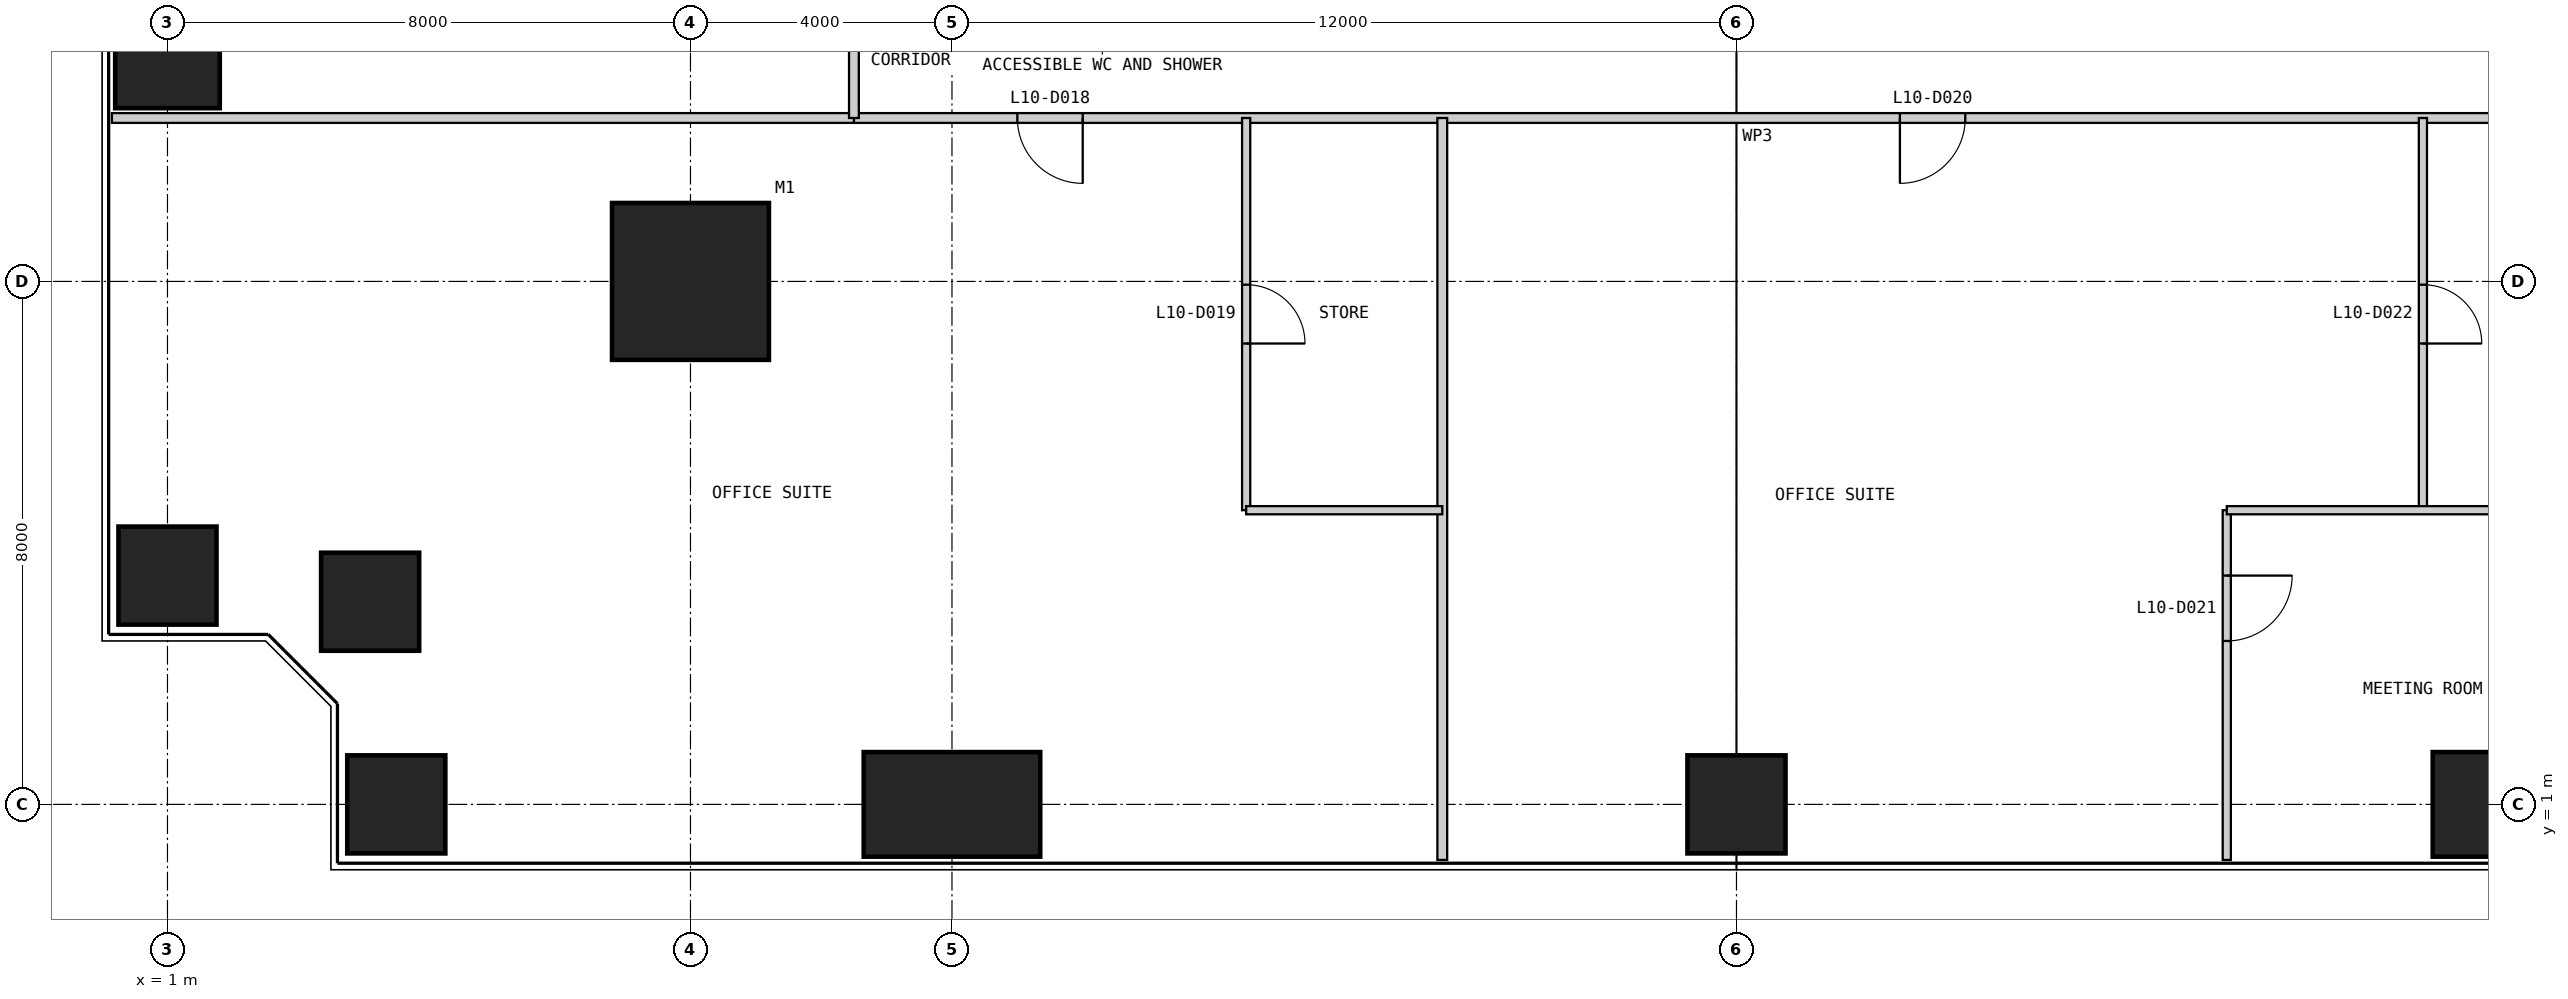
"""IFC4 building model, lengths in metres.
Left out: names, types, materials, properties, quantities, classifications, styles, units other than length and angle.
Written with IfcOpenShell. Run it as: python <this file> out.ifc"""

import sys

from ifc_helpers import new_model, si_unit, direction, frame, frame_2d, origin, origin_2d, place, context, subcontext, project, spatial, rectangle, extrude, element, fill, save


model = new_model("IFC4")
c1 = context("Model", 3, precision=1e-05, world=origin(), true_north=direction((0.0, 1.0)))
c2 = subcontext(c1, "Body", "Model", "MODEL_VIEW")
j1 = project(units=[si_unit("LENGTHUNIT", "METRE"), si_unit("PLANEANGLEUNIT", "RADIAN")], contexts=[c1])
p1 = place(None, origin())
s1 = spatial("IfcSite", under=j1, at=p1, CompositionType="ELEMENT")
p2 = place(p1, origin())
s2 = spatial("IfcBuilding", under=s1, at=p2, CompositionType="ELEMENT")
p3 = place(p2, frame((0.0, 0.0, 47.0)))
s3 = spatial("IfcBuildingStorey", under=s2, at=p3, CompositionType="ELEMENT", Elevation=47.0)
p4 = place(p3, frame((9.0, 9.0, 0.0), z_axis=(0.0, 0.0, 1.0), x_axis=(1.0, 0.0, 0.0)))
e1 = element("IfcColumn", 1, at=p4, inside=s3, PredefinedType="COLUMN", context=c2, shape_type="SweptSolid", body=[
    extrude(rectangle(XDim=2.4, YDim=2.4, at=origin_2d()), origin(), (0.0, 0.0, 1.0), 4.0),
])
p5 = place(p3, frame((4.5, 1.0, 0.0), z_axis=(0.0, 0.0, 1.0), x_axis=(1.0, 0.0, 0.0)))
e2 = element("IfcColumn", 2, at=p5, inside=s3, PredefinedType="COLUMN", context=c2, shape_type="SweptSolid", body=[
    extrude(rectangle(XDim=1.5, YDim=1.5, at=origin_2d()), origin(), (0.0, 0.0, 1.0), 4.0),
])
p6 = place(p3, frame((13.0, 1.0, 0.0), z_axis=(0.0, 0.0, 1.0), x_axis=(1.0, 0.0, 0.0)))
e3 = element("IfcColumn", 3, at=p6, inside=s3, PredefinedType="COLUMN", context=c2, shape_type="SweptSolid", body=[
    extrude(rectangle(XDim=2.7, YDim=1.6, at=origin_2d()), origin(), (0.0, 0.0, 1.0), 4.0),
])
p7 = place(p3, frame((25.0, 1.0, 0.0), z_axis=(0.0, 0.0, 1.0), x_axis=(1.0, 0.0, 0.0)))
e4 = element("IfcColumn", 4, at=p7, inside=s3, PredefinedType="COLUMN", context=c2, shape_type="SweptSolid", body=[
    extrude(rectangle(XDim=1.5, YDim=1.5, at=origin_2d()), origin(), (0.0, 0.0, 1.0), 4.0),
])
p8 = place(p3, frame((37.0, 1.0, 0.0), z_axis=(0.0, 0.0, 1.0), x_axis=(1.0, 0.0, 0.0)))
e5 = element("IfcColumn", 5, at=p8, inside=s3, PredefinedType="COLUMN", context=c2, shape_type="SweptSolid", body=[
    extrude(rectangle(XDim=2.7, YDim=1.6, at=origin_2d()), origin(), (0.0, 0.0, 1.0), 4.0),
])
p9 = place(p3, frame((1.0, 13.0, 0.0), z_axis=(0.0, 0.0, 1.0), x_axis=(1.0, 0.0, 0.0)))
e6 = element("IfcColumn", 6, at=p9, inside=s3, PredefinedType="COLUMN", context=c2, shape_type="SweptSolid", body=[
    extrude(rectangle(XDim=1.6, YDim=2.7, at=origin_2d()), origin(), (0.0, 0.0, 1.0), 4.0),
])
for number, where, z_axis, x_axis in (
    (7, (1.0, 4.5, 0.0), (0.0, 0.0, 1.0), (1.0, 0.0, 0.0)),
    (8, (4.1, 4.1, 0.0), (0.0, 0.0, 1.0), (1.0, 0.0, 0.0)),
):
    element("IfcColumn", number, at=place(p3, frame(where, z_axis=z_axis, x_axis=x_axis)), inside=s3, PredefinedType="COLUMN", context=c2, shape_type="SweptSolid", body=[
        extrude(rectangle(XDim=1.5, YDim=1.5, at=origin_2d()), origin(), (0.0, 0.0, 1.0), 4.0),
    ])
p10 = place(p3, frame((11.5, 11.5, 0.0), z_axis=(0.0, 0.0, 1.0), x_axis=(1.0, 0.0, 0.0)))
e9 = element("IfcWall", 9, at=p10, inside=s3, PredefinedType="PARTITIONING", context=c2, shape_type="SweptSolid", body=[
    extrude(rectangle(XDim=27.0, YDim=0.15, at=frame_2d((13.5, 0.0))), origin(), (0.0, 0.0, 1.0), 3.85),
])
p11 = place(p10, frame((2.5, 0.0, 0.0)))
e10 = element("IfcOpeningElement", 10, at=p11, cuts=e9, PredefinedType="OPENING", context=c2, shape_type="SweptSolid", body=[
    extrude(rectangle(XDim=1.0, YDim=2.2, at=frame_2d((0.5, 1.1))), frame((0.0, 0.085, 0.0), z_axis=(0.0, -1.0, 0.0), x_axis=(1.0, 0.0, 0.0)), (0.0, 0.0, 1.0), 0.17),
])
p12 = place(p10, frame((16.0, 0.0, 0.0)))
e11 = element("IfcOpeningElement", 11, at=p12, cuts=e9, PredefinedType="OPENING", context=c2, shape_type="SweptSolid", body=[
    extrude(rectangle(XDim=1.0, YDim=2.2, at=frame_2d((0.5, 1.1))), frame((0.0, 0.085, 0.0), z_axis=(0.0, -1.0, 0.0), x_axis=(1.0, 0.0, 0.0)), (0.0, 0.0, 1.0), 0.17),
])
p13 = place(p3, frame((0.15, 11.5, 0.0), z_axis=(0.0, 0.0, 1.0), x_axis=(1.0, 0.0, 0.0)))
e12 = element("IfcWall", 12, at=p13, inside=s3, PredefinedType="PARTITIONING", context=c2, shape_type="SweptSolid", body=[
    extrude(rectangle(XDim=11.35, YDim=0.15, at=frame_2d((5.675, 0.0))), origin(), (0.0, 0.0, 1.0), 3.85),
])
p14 = place(p3, frame((17.5, 5.5, 0.0), z_axis=(0.0, 0.0, 1.0), x_axis=(0.0, 1.0, 0.0)))
e13 = element("IfcWall", 13, at=p14, inside=s3, PredefinedType="PARTITIONING", context=c2, shape_type="SweptSolid", body=[
    extrude(rectangle(XDim=6.0, YDim=0.125, at=frame_2d((3.0, 0.0))), origin(), (0.0, 0.0, 1.0), 3.85),
])
p15 = place(p14, frame((2.55, 0.0, 0.0)))
e14 = element("IfcOpeningElement", 14, at=p15, cuts=e13, PredefinedType="OPENING", context=c2, shape_type="SweptSolid", body=[
    extrude(rectangle(XDim=0.9, YDim=2.2, at=frame_2d((0.45, 1.1))), frame((0.0, 0.073, 0.0), z_axis=(0.0, -1.0, 0.0), x_axis=(1.0, 0.0, 0.0)), (0.0, 0.0, 1.0), 0.145),
])
p16 = place(p3, frame((20.5, 0.15, 0.0), z_axis=(0.0, 0.0, 1.0), x_axis=(0.0, 1.0, 0.0)))
e15 = element("IfcWall", 15, at=p16, inside=s3, PredefinedType="PARTITIONING", context=c2, shape_type="SweptSolid", body=[
    extrude(rectangle(XDim=11.35, YDim=0.15, at=frame_2d((5.675, 0.0))), origin(), (0.0, 0.0, 1.0), 3.85),
])
p17 = place(p3, frame((32.5, 0.15, 0.0), z_axis=(0.0, 0.0, 1.0), x_axis=(0.0, 1.0, 0.0)))
e16 = element("IfcWall", 16, at=p17, inside=s3, PredefinedType="PARTITIONING", context=c2, shape_type="SweptSolid", body=[
    extrude(rectangle(XDim=5.35, YDim=0.125, at=frame_2d((2.675, 0.0))), origin(), (0.0, 0.0, 1.0), 3.85),
])
p18 = place(p17, frame((3.35, 0.0, 0.0)))
e17 = element("IfcOpeningElement", 17, at=p18, cuts=e16, PredefinedType="OPENING", context=c2, shape_type="SweptSolid", body=[
    extrude(rectangle(XDim=1.0, YDim=2.2, at=frame_2d((0.5, 1.1))), frame((0.0, 0.073, 0.0), z_axis=(0.0, -1.0, 0.0), x_axis=(1.0, 0.0, 0.0)), (0.0, 0.0, 1.0), 0.145),
])
p19 = place(p3, frame((35.5, 5.5, 0.0), z_axis=(0.0, 0.0, 1.0), x_axis=(0.0, 1.0, 0.0)))
e18 = element("IfcWall", 18, at=p19, inside=s3, PredefinedType="PARTITIONING", context=c2, shape_type="SweptSolid", body=[
    extrude(rectangle(XDim=6.0, YDim=0.125, at=frame_2d((3.0, 0.0))), origin(), (0.0, 0.0, 1.0), 3.85),
])
p20 = place(p19, frame((2.55, 0.0, 0.0)))
e19 = element("IfcOpeningElement", 19, at=p20, cuts=e18, PredefinedType="OPENING", context=c2, shape_type="SweptSolid", body=[
    extrude(rectangle(XDim=0.9, YDim=2.2, at=frame_2d((0.45, 1.1))), frame((0.0, 0.073, 0.0), z_axis=(0.0, -1.0, 0.0), x_axis=(1.0, 0.0, 0.0)), (0.0, 0.0, 1.0), 0.145),
])
p21 = place(p3, frame((17.5, 5.5, 0.0), z_axis=(0.0, 0.0, 1.0), x_axis=(1.0, 0.0, 0.0)))
e20 = element("IfcWall", 20, at=p21, inside=s3, PredefinedType="PARTITIONING", context=c2, shape_type="SweptSolid", body=[
    extrude(rectangle(XDim=3.0, YDim=0.125, at=frame_2d((1.5, 0.0))), origin(), (0.0, 0.0, 1.0), 3.85),
])
p22 = place(p3, frame((32.5, 5.5, 0.0), z_axis=(0.0, 0.0, 1.0), x_axis=(1.0, 0.0, 0.0)))
e21 = element("IfcWall", 21, at=p22, inside=s3, PredefinedType="PARTITIONING", context=c2, shape_type="SweptSolid", body=[
    extrude(rectangle(XDim=6.0, YDim=0.125, at=frame_2d((3.0, 0.0))), origin(), (0.0, 0.0, 1.0), 3.85),
])
p23 = place(p3, frame((11.5, 38.5, 0.0), z_axis=(0.0, 0.0, 1.0), x_axis=(0.0, -1.0, 0.0)))
e22 = element("IfcWall", 22, at=p23, inside=s3, PredefinedType="PARTITIONING", context=c2, shape_type="SweptSolid", body=[
    extrude(rectangle(XDim=27.0, YDim=0.15, at=frame_2d((13.5, 0.0))), origin(), (0.0, 0.0, 1.0), 3.85),
])
p24 = place(p23, frame((2.5, 0.0, 0.0)))
e23 = element("IfcOpeningElement", 23, at=p24, cuts=e22, PredefinedType="OPENING", context=c2, shape_type="SweptSolid", body=[
    extrude(rectangle(XDim=1.0, YDim=2.2, at=frame_2d((0.5, 1.1))), frame((0.0, 0.085, 0.0), z_axis=(0.0, -1.0, 0.0), x_axis=(1.0, 0.0, 0.0)), (0.0, 0.0, 1.0), 0.17),
])
p25 = place(p23, frame((13.0, 0.0, 0.0)))
e24 = element("IfcOpeningElement", 24, at=p25, cuts=e22, PredefinedType="OPENING", context=c2, shape_type="SweptSolid", body=[
    extrude(rectangle(XDim=1.0, YDim=2.2, at=frame_2d((0.5, 1.1))), frame((0.0, 0.085, 0.0), z_axis=(0.0, -1.0, 0.0), x_axis=(1.0, 0.0, 0.0)), (0.0, 0.0, 1.0), 0.17),
])
p26 = place(p23, frame((23.5, 0.0, 0.0)))
e25 = element("IfcOpeningElement", 25, at=p26, cuts=e22, PredefinedType="OPENING", context=c2, shape_type="SweptSolid", body=[
    extrude(rectangle(XDim=1.0, YDim=2.2, at=frame_2d((0.5, 1.1))), frame((0.0, 0.085, 0.0), z_axis=(0.0, -1.0, 0.0), x_axis=(1.0, 0.0, 0.0)), (0.0, 0.0, 1.0), 0.17),
])
p27 = place(p11, frame((1.0, 0.0, 0.0), z_axis=(0.0, 0.0, 1.0), x_axis=(-1.0, 0.0, 0.0)))
e26 = element("IfcDoor", 26, at=p27, inside=s3, OperationType="SINGLE_SWING_LEFT", PredefinedType="DOOR", context=c2, shape_type="SweptSolid", body=[
    extrude(rectangle(XDim=1.0, YDim=2.2, at=frame_2d((0.5, 1.1))), frame((0.0, 0.025, 0.0), z_axis=(0.0, -1.0, 0.0), x_axis=(1.0, 0.0, 0.0)), (0.0, 0.0, 1.0), 0.05),
])
fill(e10, e26)
p28 = place(p15, frame((0.9, 0.0, 0.0), z_axis=(0.0, 0.0, 1.0), x_axis=(-1.0, 0.0, 0.0)))
e27 = element("IfcDoor", 27, at=p28, inside=s3, OperationType="SINGLE_SWING_RIGHT", PredefinedType="DOOR", context=c2, shape_type="SweptSolid", body=[
    extrude(rectangle(XDim=0.9, YDim=2.2, at=frame_2d((0.45, 1.1))), frame((0.0, 0.025, 0.0), z_axis=(0.0, -1.0, 0.0), x_axis=(1.0, 0.0, 0.0)), (0.0, 0.0, 1.0), 0.05),
])
fill(e14, e27)
p29 = place(p12, frame((1.0, 0.0, 0.0), z_axis=(0.0, 0.0, 1.0), x_axis=(-1.0, 0.0, 0.0)))
e28 = element("IfcDoor", 28, at=p29, inside=s3, OperationType="SINGLE_SWING_RIGHT", PredefinedType="DOOR", context=c2, shape_type="SweptSolid", body=[
    extrude(rectangle(XDim=1.0, YDim=2.2, at=frame_2d((0.5, 1.1))), frame((0.0, 0.025, 0.0), z_axis=(0.0, -1.0, 0.0), x_axis=(1.0, 0.0, 0.0)), (0.0, 0.0, 1.0), 0.05),
])
fill(e11, e28)
p30 = place(p18, frame((1.0, 0.0, 0.0), z_axis=(0.0, 0.0, 1.0), x_axis=(-1.0, 0.0, 0.0)))
e29 = element("IfcDoor", 29, at=p30, inside=s3, OperationType="SINGLE_SWING_LEFT", PredefinedType="DOOR", context=c2, shape_type="SweptSolid", body=[
    extrude(rectangle(XDim=1.0, YDim=2.2, at=frame_2d((0.5, 1.1))), frame((0.0, 0.025, 0.0), z_axis=(0.0, -1.0, 0.0), x_axis=(1.0, 0.0, 0.0)), (0.0, 0.0, 1.0), 0.05),
])
fill(e17, e29)
p31 = place(p20, frame((0.9, 0.0, 0.0), z_axis=(0.0, 0.0, 1.0), x_axis=(-1.0, 0.0, 0.0)))
e30 = element("IfcDoor", 30, at=p31, inside=s3, OperationType="SINGLE_SWING_RIGHT", PredefinedType="DOOR", context=c2, shape_type="SweptSolid", body=[
    extrude(rectangle(XDim=0.9, YDim=2.2, at=frame_2d((0.45, 1.1))), frame((0.0, 0.025, 0.0), z_axis=(0.0, -1.0, 0.0), x_axis=(1.0, 0.0, 0.0)), (0.0, 0.0, 1.0), 0.05),
])
fill(e19, e30)
save(model, sys.argv[1])
